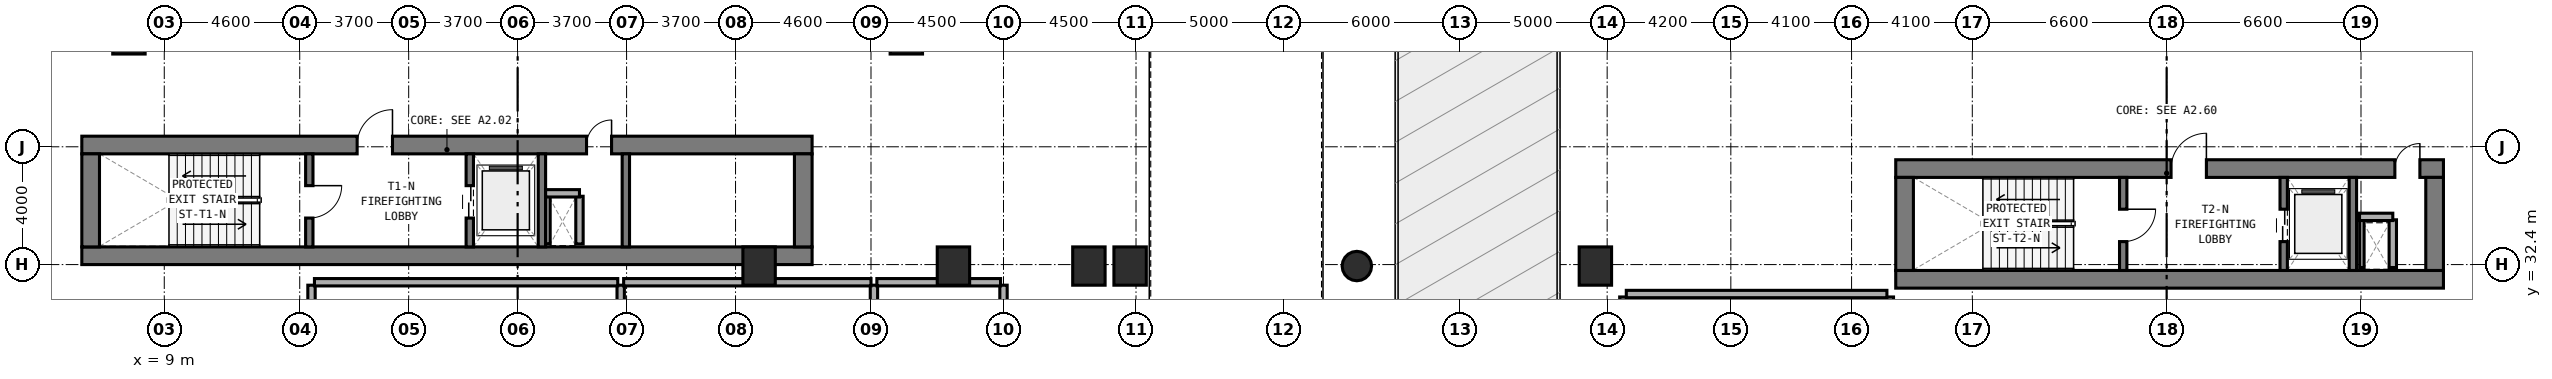
"""IFC4 building model, lengths in metres.
Left out: names, types, materials, properties, quantities, classifications, styles, units other than length and angle.
Written with IfcOpenShell. Run it as: python <this file> out.ifc"""

import sys

from ifc_helpers import new_model, si_unit, direction, frame, frame_2d, origin, origin_2d, place, context, subcontext, project, spatial, rectangle, circle, extrude, element, fill, save


model = new_model("IFC4")
c1 = context("Model", 3, precision=1e-05, world=origin(), true_north=direction((0.0, 1.0)))
c2 = subcontext(c1, "Body", "Model", "MODEL_VIEW")
j1 = project(units=[si_unit("LENGTHUNIT", "METRE"), si_unit("PLANEANGLEUNIT", "RADIAN")], contexts=[c1])
p1 = place(None, origin())
s1 = spatial("IfcSite", under=j1, at=p1, CompositionType="ELEMENT")
p2 = place(p1, origin())
s2 = spatial("IfcBuilding", under=s1, at=p2, CompositionType="ELEMENT")
p3 = place(p2, frame((0.0, 0.0, -4.2)))
s3 = spatial("IfcBuildingStorey", under=s2, at=p3, CompositionType="ELEMENT", Elevation=-4.2)
p4 = place(p3, frame((6.2, 32.7, 0.0), z_axis=(0.0, 0.0, 1.0), x_axis=(1.0, 0.0, 0.0)))
e1 = element("IfcWall", 1, at=p4, inside=s3, PredefinedType="SHEAR", context=c2, shape_type="SweptSolid", body=[
    extrude(rectangle(XDim=24.8, YDim=0.6, at=frame_2d((12.4, 0.0))), origin(), (0.0, 0.0, 1.0), 4.2),
])
p5 = place(p3, frame((6.2, 36.46, 0.0), z_axis=(0.0, 0.0, 1.0), x_axis=(1.0, 0.0, 0.0)))
e2 = element("IfcWall", 2, at=p5, inside=s3, PredefinedType="SHEAR", context=c2, shape_type="SweptSolid", body=[
    extrude(rectangle(XDim=24.8, YDim=0.6, at=frame_2d((12.4, 0.0))), origin(), (0.0, 0.0, 1.0), 4.2),
])
p6 = place(p5, frame((9.35, 0.0, 0.0)))
e3 = element("IfcOpeningElement", 3, at=p6, cuts=e2, PredefinedType="OPENING", context=c2, shape_type="SweptSolid", body=[
    extrude(rectangle(XDim=1.2, YDim=2.15, at=frame_2d((0.6, 1.075))), frame((0.0, 0.31, 0.0), z_axis=(0.0, -1.0, 0.0), x_axis=(1.0, 0.0, 0.0)), (0.0, 0.0, 1.0), 0.62),
])
p7 = place(p5, frame((17.14, 0.0, 0.0)))
e4 = element("IfcOpeningElement", 4, at=p7, cuts=e2, PredefinedType="OPENING", context=c2, shape_type="SweptSolid", body=[
    extrude(rectangle(XDim=0.85, YDim=2.1, at=frame_2d((0.425, 1.05))), frame((0.0, 0.31, 0.0), z_axis=(0.0, -1.0, 0.0), x_axis=(1.0, 0.0, 0.0)), (0.0, 0.0, 1.0), 0.62),
])
for number, where, z_axis, x_axis in (
    (5, (6.5, 33.0, 0.0), (0.0, 0.0, 1.0), (0.0, 1.0, 0.0)),
    (6, (30.7, 33.0, 0.0), (0.0, 0.0, 1.0), (0.0, 1.0, 0.0)),
):
    element("IfcWall", number, at=place(p3, frame(where, z_axis=z_axis, x_axis=x_axis)), inside=s3, PredefinedType="SHEAR", context=c2, shape_type="SweptSolid", body=[
        extrude(rectangle(XDim=3.16, YDim=0.6, at=frame_2d((1.58, 0.0))), origin(), (0.0, 0.0, 1.0), 4.2),
    ])
p8 = place(p3, frame((13.925, 33.0, 0.0), z_axis=(0.0, 0.0, 1.0), x_axis=(0.0, 1.0, 0.0)))
e7 = element("IfcWall", 7, at=p8, inside=s3, PredefinedType="STANDARD", context=c2, shape_type="SweptSolid", body=[
    extrude(rectangle(XDim=3.16, YDim=0.25, at=frame_2d((1.58, 0.0))), origin(), (0.0, 0.0, 1.0), 3.85),
])
p9 = place(p8, frame((0.98, 0.0, 0.0)))
e8 = element("IfcOpeningElement", 8, at=p9, cuts=e7, PredefinedType="OPENING", context=c2, shape_type="SweptSolid", body=[
    extrude(rectangle(XDim=1.1, YDim=2.15, at=frame_2d((0.55, 1.075))), frame((0.0, 0.135, 0.0), z_axis=(0.0, -1.0, 0.0), x_axis=(1.0, 0.0, 0.0)), (0.0, 0.0, 1.0), 0.27),
])
p10 = place(p3, frame((19.375, 33.0, 0.0), z_axis=(0.0, 0.0, 1.0), x_axis=(0.0, 1.0, 0.0)))
e9 = element("IfcWall", 9, at=p10, inside=s3, PredefinedType="STANDARD", context=c2, shape_type="SweptSolid", body=[
    extrude(rectangle(XDim=3.16, YDim=0.25, at=frame_2d((1.58, 0.0))), origin(), (0.0, 0.0, 1.0), 3.85),
])
p11 = place(p10, frame((0.98, 0.0, 0.0)))
e10 = element("IfcOpeningElement", 10, at=p11, cuts=e9, PredefinedType="OPENING", context=c2, shape_type="SweptSolid", body=[
    extrude(rectangle(XDim=1.1, YDim=2.15, at=frame_2d((0.55, 1.075))), frame((0.0, 0.135, 0.0), z_axis=(0.0, -1.0, 0.0), x_axis=(1.0, 0.0, 0.0)), (0.0, 0.0, 1.0), 0.27),
])
for number, where, z_axis, x_axis in (
    (11, (21.825, 33.0, 0.0), (0.0, 0.0, 1.0), (0.0, 1.0, 0.0)),
    (12, (24.675, 33.0, 0.0), (0.0, 0.0, 1.0), (0.0, 1.0, 0.0)),
):
    element("IfcWall", number, at=place(p3, frame(where, z_axis=z_axis, x_axis=x_axis)), inside=s3, PredefinedType="STANDARD", context=c2, shape_type="SweptSolid", body=[
        extrude(rectangle(XDim=3.16, YDim=0.25, at=frame_2d((1.58, 0.0))), origin(), (0.0, 0.0, 1.0), 3.85),
    ])
p12 = place(p3, frame((67.8, 31.9, 0.0), z_axis=(0.0, 0.0, 1.0), x_axis=(1.0, 0.0, 0.0)))
e13 = element("IfcWall", 13, at=p12, inside=s3, PredefinedType="SHEAR", context=c2, shape_type="SweptSolid", body=[
    extrude(rectangle(XDim=18.6, YDim=0.6, at=frame_2d((9.3, 0.0))), origin(), (0.0, 0.0, 1.0), 4.2),
])
p13 = place(p3, frame((67.8, 35.66, 0.0), z_axis=(0.0, 0.0, 1.0), x_axis=(1.0, 0.0, 0.0)))
e14 = element("IfcWall", 14, at=p13, inside=s3, PredefinedType="SHEAR", context=c2, shape_type="SweptSolid", body=[
    extrude(rectangle(XDim=18.6, YDim=0.6, at=frame_2d((9.3, 0.0))), origin(), (0.0, 0.0, 1.0), 4.2),
])
p14 = place(p13, frame((9.35, 0.0, 0.0)))
e15 = element("IfcOpeningElement", 15, at=p14, cuts=e14, PredefinedType="OPENING", context=c2, shape_type="SweptSolid", body=[
    extrude(rectangle(XDim=1.2, YDim=2.15, at=frame_2d((0.6, 1.075))), frame((0.0, 0.31, 0.0), z_axis=(0.0, -1.0, 0.0), x_axis=(1.0, 0.0, 0.0)), (0.0, 0.0, 1.0), 0.62),
])
p15 = place(p13, frame((16.95, 0.0, 0.0)))
e16 = element("IfcOpeningElement", 16, at=p15, cuts=e14, PredefinedType="OPENING", context=c2, shape_type="SweptSolid", body=[
    extrude(rectangle(XDim=0.85, YDim=2.1, at=frame_2d((0.425, 1.05))), frame((0.0, 0.31, 0.0), z_axis=(0.0, -1.0, 0.0), x_axis=(1.0, 0.0, 0.0)), (0.0, 0.0, 1.0), 0.62),
])
for number, where, z_axis, x_axis in (
    (17, (68.1, 32.2, 0.0), (0.0, 0.0, 1.0), (0.0, 1.0, 0.0)),
    (18, (86.1, 32.2, 0.0), (0.0, 0.0, 1.0), (0.0, 1.0, 0.0)),
):
    element("IfcWall", number, at=place(p3, frame(where, z_axis=z_axis, x_axis=x_axis)), inside=s3, PredefinedType="SHEAR", context=c2, shape_type="SweptSolid", body=[
        extrude(rectangle(XDim=3.16, YDim=0.6, at=frame_2d((1.58, 0.0))), origin(), (0.0, 0.0, 1.0), 4.2),
    ])
p16 = place(p3, frame((75.525, 32.2, 0.0), z_axis=(0.0, 0.0, 1.0), x_axis=(0.0, 1.0, 0.0)))
e19 = element("IfcWall", 19, at=p16, inside=s3, PredefinedType="STANDARD", context=c2, shape_type="SweptSolid", body=[
    extrude(rectangle(XDim=3.16, YDim=0.25, at=frame_2d((1.58, 0.0))), origin(), (0.0, 0.0, 1.0), 3.85),
])
p17 = place(p16, frame((0.98, 0.0, 0.0)))
e20 = element("IfcOpeningElement", 20, at=p17, cuts=e19, PredefinedType="OPENING", context=c2, shape_type="SweptSolid", body=[
    extrude(rectangle(XDim=1.1, YDim=2.15, at=frame_2d((0.55, 1.075))), frame((0.0, 0.135, 0.0), z_axis=(0.0, -1.0, 0.0), x_axis=(1.0, 0.0, 0.0)), (0.0, 0.0, 1.0), 0.27),
])
p18 = place(p3, frame((80.975, 32.2, 0.0), z_axis=(0.0, 0.0, 1.0), x_axis=(0.0, 1.0, 0.0)))
e21 = element("IfcWall", 21, at=p18, inside=s3, PredefinedType="STANDARD", context=c2, shape_type="SweptSolid", body=[
    extrude(rectangle(XDim=3.16, YDim=0.25, at=frame_2d((1.58, 0.0))), origin(), (0.0, 0.0, 1.0), 3.85),
])
p19 = place(p18, frame((0.98, 0.0, 0.0)))
e22 = element("IfcOpeningElement", 22, at=p19, cuts=e21, PredefinedType="OPENING", context=c2, shape_type="SweptSolid", body=[
    extrude(rectangle(XDim=1.1, YDim=2.15, at=frame_2d((0.55, 1.075))), frame((0.0, 0.135, 0.0), z_axis=(0.0, -1.0, 0.0), x_axis=(1.0, 0.0, 0.0)), (0.0, 0.0, 1.0), 0.27),
])
p20 = place(p3, frame((83.325, 32.2, 0.0), z_axis=(0.0, 0.0, 1.0), x_axis=(0.0, 1.0, 0.0)))
e23 = element("IfcWall", 23, at=p20, inside=s3, PredefinedType="STANDARD", context=c2, shape_type="SweptSolid", body=[
    extrude(rectangle(XDim=3.16, YDim=0.25, at=frame_2d((1.58, 0.0))), origin(), (0.0, 0.0, 1.0), 3.85),
])
for number, where, z_axis, x_axis in (
    (24, (34.2, 40.2, 0.0), (0.0, 0.0, 1.0), (1.0, 0.0, 0.0)),
    (25, (7.8, 40.2, 0.0), (0.0, 0.0, 1.0), (1.0, 0.0, 0.0)),
    (26, (35.8, 32.35, 0.0), (0.0, 0.0, 1.0), (1.0, 0.0, 0.0)),
    (27, (29.2, 32.35, 0.0), (0.0, 0.0, 1.0), (1.0, 0.0, 0.0)),
    (28, (40.4, 32.35, 0.0), (0.0, 0.0, 1.0), (1.0, 0.0, 0.0)),
    (29, (41.8, 32.35, 0.0), (0.0, 0.0, 1.0), (1.0, 0.0, 0.0)),
):
    element("IfcColumn", number, at=place(p3, frame(where, z_axis=z_axis, x_axis=x_axis)), inside=s3, PredefinedType="COLUMN", context=c2, shape_type="SweptSolid", body=[
        extrude(rectangle(XDim=1.1, YDim=1.3, at=origin_2d()), origin(), (0.0, 0.0, 1.0), 4.2),
    ])
p21 = place(p3, frame((49.5, 32.35, 0.0), z_axis=(0.0, 0.0, 1.0), x_axis=(1.0, 0.0, 0.0)))
e30 = element("IfcColumn", 30, at=p21, inside=s3, PredefinedType="COLUMN", context=c2, shape_type="SweptSolid", body=[
    extrude(circle(Radius=0.5, at=origin_2d()), origin(), (0.0, 0.0, 1.0), 4.2),
])
p22 = place(p3, frame((57.6, 32.35, 0.0), z_axis=(0.0, 0.0, 1.0), x_axis=(1.0, 0.0, 0.0)))
e31 = element("IfcColumn", 31, at=p22, inside=s3, PredefinedType="COLUMN", context=c2, shape_type="SweptSolid", body=[
    extrude(rectangle(XDim=1.1, YDim=1.3, at=origin_2d()), origin(), (0.0, 0.0, 1.0), 4.2),
])
p23 = place(p3, frame((22.03, 33.1, 0.0), z_axis=(0.0, 0.0, 1.0), x_axis=(0.0, 1.0, 0.0)))
e32 = element("IfcWall", 32, at=p23, inside=s3, PredefinedType="PARTITIONING", context=c2, shape_type="SweptSolid", body=[
    extrude(rectangle(XDim=1.62, YDim=0.15, at=frame_2d((0.81, 0.0))), origin(), (0.0, 0.0, 1.0), 3.85),
])
p24 = place(p3, frame((23.1, 33.1, 0.0), z_axis=(0.0, 0.0, 1.0), x_axis=(0.0, 1.0, 0.0)))
e33 = element("IfcWall", 33, at=p24, inside=s3, PredefinedType="SOLIDWALL", context=c2, shape_type="SweptSolid", body=[
    extrude(rectangle(XDim=1.62, YDim=0.25, at=frame_2d((0.81, 0.0))), origin(), (0.0, 0.0, 1.0), 3.85),
])
p25 = place(p3, frame((21.95, 34.82, 0.0), z_axis=(0.0, 0.0, 1.0), x_axis=(1.0, 0.0, 0.0)))
e34 = element("IfcWall", 34, at=p25, inside=s3, PredefinedType="SOLIDWALL", context=c2, shape_type="SweptSolid", body=[
    extrude(rectangle(XDim=1.15, YDim=0.25, at=frame_2d((0.575, 0.0))), origin(), (0.0, 0.0, 1.0), 3.85),
])
p26 = place(p3, frame((83.63, 32.3, 0.0), z_axis=(0.0, 0.0, 1.0), x_axis=(0.0, 1.0, 0.0)))
e35 = element("IfcWall", 35, at=p26, inside=s3, PredefinedType="PARTITIONING", context=c2, shape_type="SweptSolid", body=[
    extrude(rectangle(XDim=1.62, YDim=0.15, at=frame_2d((0.81, 0.0))), origin(), (0.0, 0.0, 1.0), 3.325),
])
p27 = place(p3, frame((84.68, 32.3, 0.0), z_axis=(0.0, 0.0, 1.0), x_axis=(0.0, 1.0, 0.0)))
e36 = element("IfcWall", 36, at=p27, inside=s3, PredefinedType="SOLIDWALL", context=c2, shape_type="SweptSolid", body=[
    extrude(rectangle(XDim=1.62, YDim=0.25, at=frame_2d((0.81, 0.0))), origin(), (0.0, 0.0, 1.0), 3.85),
])
p28 = place(p3, frame((83.55, 34.02, 0.0), z_axis=(0.0, 0.0, 1.0), x_axis=(1.0, 0.0, 0.0)))
e37 = element("IfcWall", 37, at=p28, inside=s3, PredefinedType="SOLIDWALL", context=c2, shape_type="SweptSolid", body=[
    extrude(rectangle(XDim=1.13, YDim=0.25, at=frame_2d((0.565, 0.0))), origin(), (0.0, 0.0, 1.0), 3.85),
])
for number, where, z_axis, x_axis in (
    (38, (14.0, 18.35, 0.0), (0.0, 0.0, 1.0), (0.0, 1.0, 0.0)),
    (39, (24.5, 18.35, 0.0), (0.0, 0.0, 1.0), (0.0, 1.0, 0.0)),
):
    element("IfcWall", number, at=place(p3, frame(where, z_axis=z_axis, x_axis=x_axis)), inside=s3, PredefinedType="SOLIDWALL", context=c2, shape_type="SweptSolid", body=[
        extrude(rectangle(XDim=13.35, YDim=0.25, at=frame_2d((6.675, 0.0))), origin(), (0.0, 0.0, 1.0), 3.85),
    ])
p29 = place(p3, frame((14.1, 31.8, 0.0), z_axis=(0.0, 0.0, 1.0), x_axis=(1.0, 0.0, 0.0)))
e40 = element("IfcWall", 40, at=p29, inside=s3, PredefinedType="SOLIDWALL", context=c2, shape_type="SweptSolid", body=[
    extrude(rectangle(XDim=10.3, YDim=0.25, at=frame_2d((5.15, 0.0))), origin(), (0.0, 0.0, 1.0), 3.85),
])
p30 = place(p3, frame((33.1, 18.35, 0.0), z_axis=(0.0, 0.0, 1.0), x_axis=(0.0, 1.0, 0.0)))
e41 = element("IfcWall", 41, at=p30, inside=s3, PredefinedType="SOLIDWALL", context=c2, shape_type="SweptSolid", body=[
    extrude(rectangle(XDim=13.35, YDim=0.25, at=frame_2d((6.675, 0.0))), origin(), (0.0, 0.0, 1.0), 3.85),
])
p31 = place(p3, frame((24.6, 31.8, 0.0), z_axis=(0.0, 0.0, 1.0), x_axis=(1.0, 0.0, 0.0)))
e42 = element("IfcWall", 42, at=p31, inside=s3, PredefinedType="SOLIDWALL", context=c2, shape_type="SweptSolid", body=[
    extrude(rectangle(XDim=8.4, YDim=0.25, at=frame_2d((4.2, 0.0))), origin(), (0.0, 0.0, 1.0), 3.125),
])
p32 = place(p3, frame((37.5, 18.35, 0.0), z_axis=(0.0, 0.0, 1.0), x_axis=(0.0, 1.0, 0.0)))
e43 = element("IfcWall", 43, at=p32, inside=s3, PredefinedType="SOLIDWALL", context=c2, shape_type="SweptSolid", body=[
    extrude(rectangle(XDim=13.35, YDim=0.25, at=frame_2d((6.675, 0.0))), origin(), (0.0, 0.0, 1.0), 3.85),
])
p33 = place(p3, frame((33.2, 31.8, 0.0), z_axis=(0.0, 0.0, 1.0), x_axis=(1.0, 0.0, 0.0)))
e44 = element("IfcWall", 44, at=p33, inside=s3, PredefinedType="SOLIDWALL", context=c2, shape_type="SweptSolid", body=[
    extrude(rectangle(XDim=4.2, YDim=0.25, at=frame_2d((2.1, 0.0))), origin(), (0.0, 0.0, 1.0), 3.375),
])
p34 = place(p3, frame((58.55, 18.35, 0.0), z_axis=(0.0, 0.0, 1.0), x_axis=(0.0, 1.0, 0.0)))
e45 = element("IfcWall", 45, at=p34, inside=s3, PredefinedType="SOLIDWALL", context=c2, shape_type="SweptSolid", body=[
    extrude(rectangle(XDim=12.95, YDim=0.25, at=frame_2d((6.475, 0.0))), origin(), (0.0, 0.0, 1.0), 3.85),
])
p35 = place(p3, frame((67.6, 18.35, 0.0), z_axis=(0.0, 0.0, 1.0), x_axis=(0.0, 1.0, 0.0)))
e46 = element("IfcWall", 46, at=p35, inside=s3, PredefinedType="SOLIDWALL", context=c2, shape_type="SweptSolid", body=[
    extrude(rectangle(XDim=12.95, YDim=0.25, at=frame_2d((6.475, 0.0))), origin(), (0.0, 0.0, 1.0), 3.325),
])
p36 = place(p3, frame((58.65, 31.4, 0.0), z_axis=(0.0, 0.0, 1.0), x_axis=(1.0, 0.0, 0.0)))
e47 = element("IfcWall", 47, at=p36, inside=s3, PredefinedType="SOLIDWALL", context=c2, shape_type="SweptSolid", body=[
    extrude(rectangle(XDim=8.85, YDim=0.25, at=frame_2d((4.425, 0.0))), origin(), (0.0, 0.0, 1.0), 3.465),
])
p37 = place(p9, frame((1.1, 0.0, 0.0), z_axis=(0.0, 0.0, 1.0), x_axis=(-1.0, 0.0, 0.0)))
e48 = element("IfcDoor", 48, at=p37, inside=s3, OperationType="SINGLE_SWING_LEFT", PredefinedType="DOOR", context=c2, shape_type="SweptSolid", body=[
    extrude(rectangle(XDim=1.1, YDim=2.15, at=frame_2d((0.55, 1.075))), frame((0.0, 0.025, 0.0), z_axis=(0.0, -1.0, 0.0), x_axis=(1.0, 0.0, 0.0)), (0.0, 0.0, 1.0), 0.05),
])
fill(e8, e48)
p38 = place(p6, origin())
e49 = element("IfcDoor", 49, at=p38, inside=s3, OperationType="SINGLE_SWING_RIGHT", PredefinedType="DOOR", context=c2, shape_type="SweptSolid", body=[
    extrude(rectangle(XDim=1.2, YDim=2.15, at=frame_2d((0.6, 1.075))), frame((0.0, 0.025, 0.0), z_axis=(0.0, -1.0, 0.0), x_axis=(1.0, 0.0, 0.0)), (0.0, 0.0, 1.0), 0.05),
])
fill(e3, e49)
p39 = place(p11, origin())
e50 = element("IfcDoor", 50, at=p39, inside=s3, OperationType="DOUBLE_DOOR_SLIDING", PredefinedType="DOOR", context=c2, shape_type="SweptSolid", body=[
    extrude(rectangle(XDim=1.1, YDim=2.15, at=frame_2d((0.55, 1.075))), frame((0.0, 0.025, 0.0), z_axis=(0.0, -1.0, 0.0), x_axis=(1.0, 0.0, 0.0)), (0.0, 0.0, 1.0), 0.05),
])
fill(e10, e50)
p40 = place(p7, origin())
e51 = element("IfcDoor", 51, at=p40, inside=s3, OperationType="SINGLE_SWING_RIGHT", PredefinedType="DOOR", context=c2, shape_type="SweptSolid", body=[
    extrude(rectangle(XDim=0.85, YDim=2.1, at=frame_2d((0.425, 1.05))), frame((0.0, 0.025, 0.0), z_axis=(0.0, -1.0, 0.0), x_axis=(1.0, 0.0, 0.0)), (0.0, 0.0, 1.0), 0.05),
])
fill(e4, e51)
p41 = place(p17, frame((1.1, 0.0, 0.0), z_axis=(0.0, 0.0, 1.0), x_axis=(-1.0, 0.0, 0.0)))
e52 = element("IfcDoor", 52, at=p41, inside=s3, OperationType="SINGLE_SWING_LEFT", PredefinedType="DOOR", context=c2, shape_type="SweptSolid", body=[
    extrude(rectangle(XDim=1.1, YDim=2.15, at=frame_2d((0.55, 1.075))), frame((0.0, 0.025, 0.0), z_axis=(0.0, -1.0, 0.0), x_axis=(1.0, 0.0, 0.0)), (0.0, 0.0, 1.0), 0.05),
])
fill(e20, e52)
p42 = place(p14, origin())
e53 = element("IfcDoor", 53, at=p42, inside=s3, OperationType="SINGLE_SWING_RIGHT", PredefinedType="DOOR", context=c2, shape_type="SweptSolid", body=[
    extrude(rectangle(XDim=1.2, YDim=2.15, at=frame_2d((0.6, 1.075))), frame((0.0, 0.025, 0.0), z_axis=(0.0, -1.0, 0.0), x_axis=(1.0, 0.0, 0.0)), (0.0, 0.0, 1.0), 0.05),
])
fill(e15, e53)
p43 = place(p19, origin())
e54 = element("IfcDoor", 54, at=p43, inside=s3, OperationType="DOUBLE_DOOR_SLIDING", PredefinedType="DOOR", context=c2, shape_type="SweptSolid", body=[
    extrude(rectangle(XDim=1.1, YDim=2.15, at=frame_2d((0.55, 1.075))), frame((0.0, 0.025, 0.0), z_axis=(0.0, -1.0, 0.0), x_axis=(1.0, 0.0, 0.0)), (0.0, 0.0, 1.0), 0.05),
])
fill(e22, e54)
p44 = place(p15, origin())
e55 = element("IfcDoor", 55, at=p44, inside=s3, OperationType="SINGLE_SWING_RIGHT", PredefinedType="DOOR", context=c2, shape_type="SweptSolid", body=[
    extrude(rectangle(XDim=0.85, YDim=2.1, at=frame_2d((0.425, 1.05))), frame((0.0, 0.025, 0.0), z_axis=(0.0, -1.0, 0.0), x_axis=(1.0, 0.0, 0.0)), (0.0, 0.0, 1.0), 0.05),
])
fill(e16, e55)
save(model, sys.argv[1])
